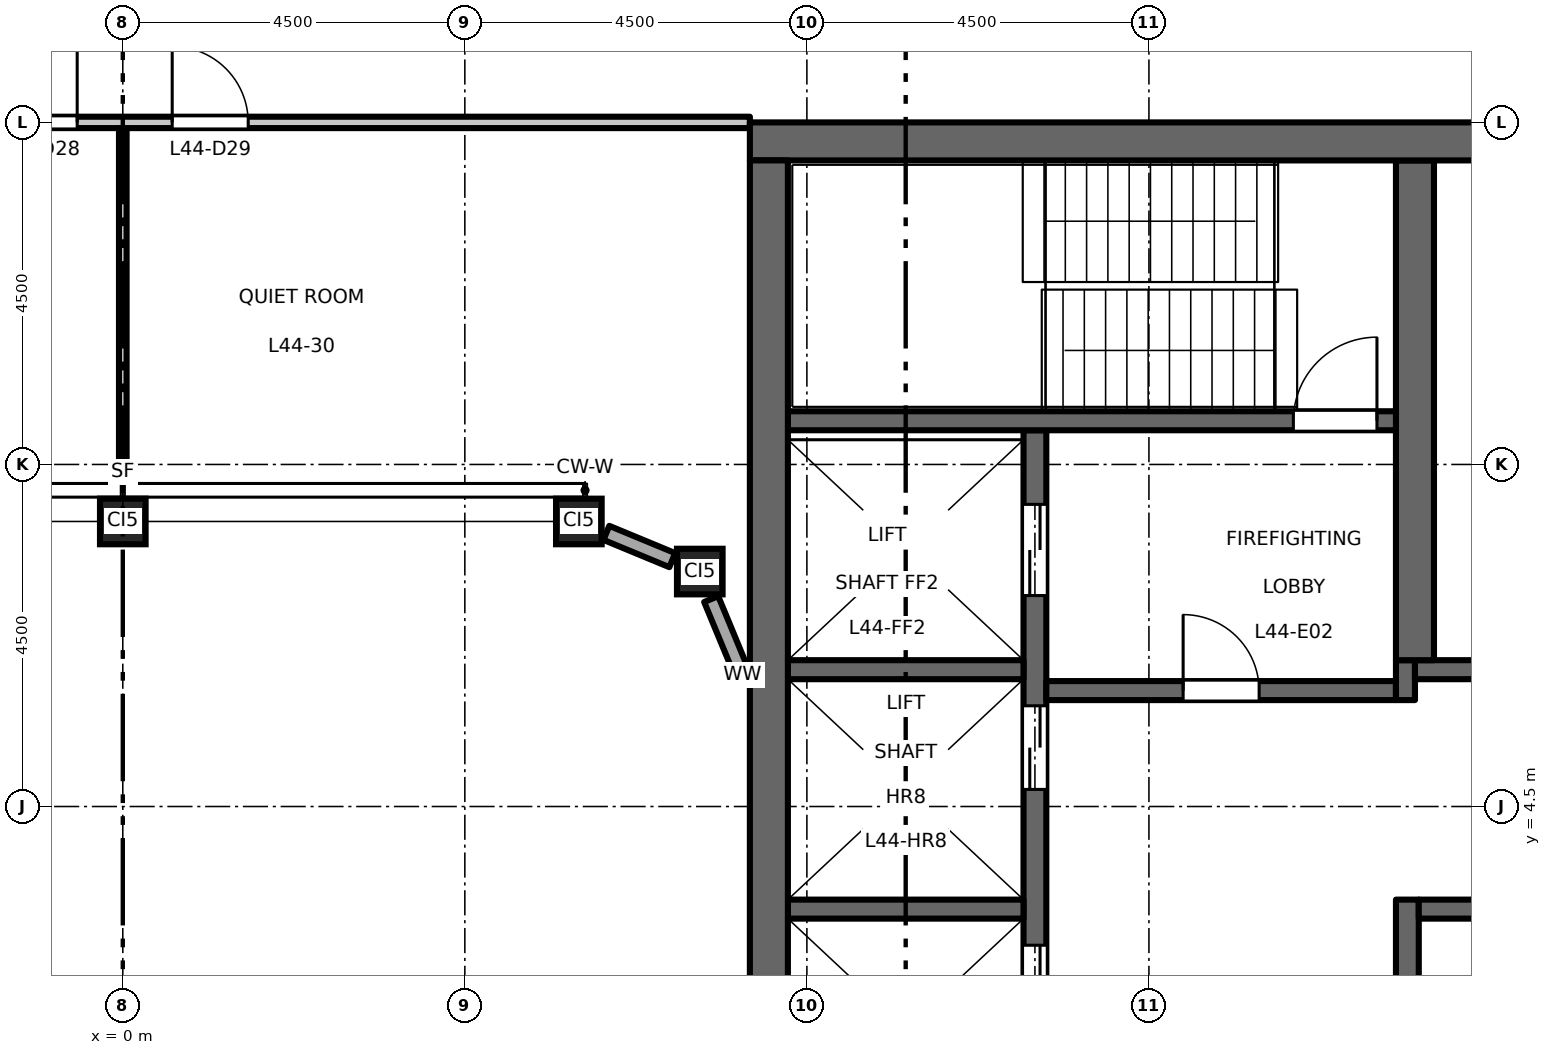
"""IFC4 building model, lengths in metres.
Left out: names, types, materials, properties, quantities, classifications, styles, units other than length and angle.
Written with IfcOpenShell. Run it as: python <this file> out.ifc"""

import sys

from ifc_helpers import new_model, si_unit, direction, frame, frame_2d, origin, origin_2d, place, context, subcontext, project, spatial, rectangle, hollow_rectangle, extrude, element, fill, save


model = new_model("IFC4")
c1 = context("Model", 3, precision=1e-05, world=origin(), true_north=direction((0.0, 1.0)))
c2 = subcontext(c1, "Body", "Model", "MODEL_VIEW")
j1 = project(units=[si_unit("LENGTHUNIT", "METRE"), si_unit("PLANEANGLEUNIT", "RADIAN")], contexts=[c1])
p1 = place(None, origin())
s1 = spatial("IfcSite", under=j1, at=p1, CompositionType="ELEMENT")
p2 = place(p1, origin())
s2 = spatial("IfcBuilding", under=s1, at=p2, CompositionType="ELEMENT")
p3 = place(p2, frame((0.0, 0.0, 206.2)))
s3 = spatial("IfcBuildingStorey", under=s2, at=p3, CompositionType="ELEMENT", Elevation=206.2)
for number, where, z_axis, x_axis in (
    (1, (0.0, 8.25, 0.0), (0.0, 0.0, 1.0), (1.0, 0.0, 0.0)),
    (2, (6.0, 8.25, 0.0), (0.0, 0.0, 1.0), (1.0, 0.0, 0.0)),
    (3, (7.591, 7.591, 0.0), (0.0, 0.0, 1.0), (1.0, 0.0, 0.0)),
):
    element("IfcColumn", number, at=place(p3, frame(where, z_axis=z_axis, x_axis=x_axis)), inside=s3, PredefinedType="COLUMN", context=c2, shape_type="SweptSolid", body=[
        extrude(hollow_rectangle(XDim=0.6, YDim=0.6, WallThickness=0.032, at=origin_2d()), origin(), (0.0, 0.0, 1.0), 4.5),
    ])
p4 = place(p3, frame((12.0, -9.45, 0.0), z_axis=(0.0, 0.0, 1.0), x_axis=(0.0, 1.0, 0.0)))
e4 = element("IfcWall", 4, at=p4, inside=s3, PredefinedType="SHEAR", context=c2, shape_type="SweptSolid", body=[
    extrude(rectangle(XDim=18.9, YDim=0.3, at=frame_2d((9.45, 0.0))), origin(), (0.0, 0.0, 1.0), 4.35),
])
p5 = place(p4, frame((4.725, 0.0, 0.0)))
e5 = element("IfcOpeningElement", 5, at=p5, cuts=e4, PredefinedType="OPENING", context=c2, shape_type="SweptSolid", body=[
    extrude(rectangle(XDim=1.1, YDim=2.1, at=frame_2d((0.55, 1.05))), frame((0.0, 0.16, 0.0), z_axis=(0.0, -1.0, 0.0), x_axis=(1.0, 0.0, 0.0)), (0.0, 0.0, 1.0), 0.32),
])
p6 = place(p4, frame((7.875, 0.0, 0.0)))
e6 = element("IfcOpeningElement", 6, at=p6, cuts=e4, PredefinedType="OPENING", context=c2, shape_type="SweptSolid", body=[
    extrude(rectangle(XDim=1.1, YDim=2.1, at=frame_2d((0.55, 1.05))), frame((0.0, 0.16, 0.0), z_axis=(0.0, -1.0, 0.0), x_axis=(1.0, 0.0, 0.0)), (0.0, 0.0, 1.0), 0.32),
])
p7 = place(p4, frame((11.025, 0.0, 0.0)))
e7 = element("IfcOpeningElement", 7, at=p7, cuts=e4, PredefinedType="OPENING", context=c2, shape_type="SweptSolid", body=[
    extrude(rectangle(XDim=1.1, YDim=2.1, at=frame_2d((0.55, 1.05))), frame((0.0, 0.16, 0.0), z_axis=(0.0, -1.0, 0.0), x_axis=(1.0, 0.0, 0.0)), (0.0, 0.0, 1.0), 0.32),
])
p8 = place(p4, frame((14.175, 0.0, 0.0)))
e8 = element("IfcOpeningElement", 8, at=p8, cuts=e4, PredefinedType="OPENING", context=c2, shape_type="SweptSolid", body=[
    extrude(rectangle(XDim=1.1, YDim=2.1, at=frame_2d((0.55, 1.05))), frame((0.0, 0.16, 0.0), z_axis=(0.0, -1.0, 0.0), x_axis=(1.0, 0.0, 0.0)), (0.0, 0.0, 1.0), 0.32),
])
p9 = place(p4, frame((16.725, 0.0, 0.0)))
e9 = element("IfcOpeningElement", 9, at=p9, cuts=e4, PredefinedType="OPENING", context=c2, shape_type="SweptSolid", body=[
    extrude(rectangle(XDim=1.2, YDim=2.1, at=frame_2d((0.6, 1.05))), frame((0.0, 0.16, 0.0), z_axis=(0.0, -1.0, 0.0), x_axis=(1.0, 0.0, 0.0)), (0.0, 0.0, 1.0), 0.32),
])
p10 = place(p4, frame((0.975, 0.0, 0.0)))
e10 = element("IfcOpeningElement", 10, at=p10, cuts=e4, PredefinedType="OPENING", context=c2, shape_type="SweptSolid", body=[
    extrude(rectangle(XDim=1.2, YDim=2.1, at=frame_2d((0.6, 1.05))), frame((0.0, 0.16, 0.0), z_axis=(0.0, -1.0, 0.0), x_axis=(1.0, 0.0, 0.0)), (0.0, 0.0, 1.0), 0.32),
])
p11 = place(p3, frame((12.15, 6.025, 0.0), z_axis=(0.0, 0.0, 1.0), x_axis=(1.0, 0.0, 0.0)))
e11 = element("IfcWall", 11, at=p11, inside=s3, PredefinedType="SHEAR", context=c2, shape_type="SweptSolid", body=[
    extrude(rectangle(XDim=4.6, YDim=0.25, at=frame_2d((2.3, 0.0))), origin(), (0.0, 0.0, 1.0), 4.35),
])
p12 = place(p11, frame((1.8, 0.0, 0.0)))
e12 = element("IfcOpeningElement", 12, at=p12, cuts=e11, PredefinedType="OPENING", context=c2, shape_type="SweptSolid", body=[
    extrude(rectangle(XDim=1.0, YDim=2.1, at=frame_2d((0.5, 1.05))), frame((0.0, 0.135, 0.0), z_axis=(0.0, -1.0, 0.0), x_axis=(1.0, 0.0, 0.0)), (0.0, 0.0, 1.0), 0.27),
])
p13 = place(p3, frame((16.875, 5.9, 0.0), z_axis=(0.0, 0.0, 1.0), x_axis=(0.0, 1.0, 0.0)))
e13 = element("IfcWall", 13, at=p13, inside=s3, PredefinedType="SHEAR", context=c2, shape_type="SweptSolid", body=[
    extrude(rectangle(XDim=0.525, YDim=0.25, at=frame_2d((0.263, 0.0))), origin(), (0.0, 0.0, 1.0), 4.35),
])
p14 = place(p3, frame((17.0, 6.3, 0.0), z_axis=(0.0, 0.0, 1.0), x_axis=(1.0, 0.0, 0.0)))
e14 = element("IfcWall", 14, at=p14, inside=s3, PredefinedType="SHEAR", context=c2, shape_type="SweptSolid", body=[
    extrude(rectangle(XDim=4.25, YDim=0.25, at=frame_2d((2.125, 0.0))), origin(), (0.0, 0.0, 1.0), 4.35),
])
p15 = place(p3, frame((16.9, -3.275, 0.0), z_axis=(0.0, 0.0, 1.0), x_axis=(0.0, 1.0, 0.0)))
e15 = element("IfcWall", 15, at=p15, inside=s3, PredefinedType="SHEAR", context=c2, shape_type="SweptSolid", body=[
    extrude(rectangle(XDim=6.55, YDim=0.3, at=frame_2d((3.275, 0.0))), origin(), (0.0, 0.0, 1.0), 4.35),
])
p16 = place(p15, frame((2.825, 0.0, 0.0)))
e16 = element("IfcOpeningElement", 16, at=p16, cuts=e15, PredefinedType="OPENING", context=c2, shape_type="SweptSolid", body=[
    extrude(rectangle(XDim=0.9, YDim=2.1, at=frame_2d((0.45, 1.05))), frame((0.0, 0.16, 0.0), z_axis=(0.0, -1.0, 0.0), x_axis=(1.0, 0.0, 0.0)), (0.0, 0.0, 1.0), 0.32),
])
p17 = place(p3, frame((17.05, 3.15, 0.0), z_axis=(0.0, 0.0, 1.0), x_axis=(1.0, 0.0, 0.0)))
e17 = element("IfcWall", 17, at=p17, inside=s3, PredefinedType="SHEAR", context=c2, shape_type="SweptSolid", body=[
    extrude(rectangle(XDim=4.2, YDim=0.25, at=frame_2d((2.1, 0.0))), origin(), (0.0, 0.0, 1.0), 4.35),
])
p18 = place(p3, frame((17.0, 6.425, 0.0), z_axis=(0.0, 0.0, 1.0), x_axis=(0.0, 1.0, 0.0)))
e18 = element("IfcWall", 18, at=p18, inside=s3, PredefinedType="SHEAR", context=c2, shape_type="SweptSolid", body=[
    extrude(rectangle(XDim=6.575, YDim=0.5, at=frame_2d((3.288, 0.0))), origin(), (0.0, 0.0, 1.0), 4.35),
])
for number, where, z_axis, x_axis in (
    (19, (8.75, 3.15, 0.0), (0.0, 0.0, 1.0), (1.0, 0.0, 0.0)),
    (20, (8.75, 6.3, 0.0), (0.0, 0.0, 1.0), (1.0, 0.0, 0.0)),
):
    element("IfcWall", number, at=place(p3, frame(where, z_axis=z_axis, x_axis=x_axis)), inside=s3, PredefinedType="SHEAR", context=c2, shape_type="SweptSolid", body=[
        extrude(rectangle(XDim=3.1, YDim=0.25, at=frame_2d((1.55, 0.0))), origin(), (0.0, 0.0, 1.0), 4.35),
    ])
p19 = place(p3, frame((8.75, 9.575, 0.0), z_axis=(0.0, 0.0, 1.0), x_axis=(1.0, 0.0, 0.0)))
e21 = element("IfcWall", 21, at=p19, inside=s3, PredefinedType="SHEAR", context=c2, shape_type="SweptSolid", body=[
    extrude(rectangle(XDim=8.0, YDim=0.25, at=frame_2d((4.0, 0.0))), origin(), (0.0, 0.0, 1.0), 4.35),
])
p20 = place(p19, frame((6.65, 0.0, 0.0)))
e22 = element("IfcOpeningElement", 22, at=p20, cuts=e21, PredefinedType="OPENING", context=c2, shape_type="SweptSolid", body=[
    extrude(rectangle(XDim=1.1, YDim=2.1, at=frame_2d((0.55, 1.05))), frame((0.0, 0.135, 0.0), z_axis=(0.0, -1.0, 0.0), x_axis=(1.0, 0.0, 0.0)), (0.0, 0.0, 1.0), 0.27),
])
p21 = place(p3, frame((8.25, 13.25, 0.0), z_axis=(0.0, 0.0, 1.0), x_axis=(1.0, 0.0, 0.0)))
e23 = element("IfcWall", 23, at=p21, inside=s3, PredefinedType="SHEAR", context=c2, shape_type="SweptSolid", body=[
    extrude(rectangle(XDim=13.5, YDim=0.5, at=frame_2d((6.75, 0.0))), origin(), (0.0, 0.0, 1.0), 4.35),
])
p22 = place(p3, frame((8.5, -13.0, 0.0), z_axis=(0.0, 0.0, 1.0), x_axis=(0.0, 1.0, 0.0)))
e24 = element("IfcWall", 24, at=p22, inside=s3, PredefinedType="SHEAR", context=c2, shape_type="SweptSolid", body=[
    extrude(rectangle(XDim=26.0, YDim=0.5, at=frame_2d((13.0, 0.0))), origin(), (0.0, 0.0, 1.0), 4.35),
])
p23 = place(p3, frame((8.154, 6.231, 0.0), z_axis=(0.0, 0.0, 1.0), x_axis=(-0.382704496366, 0.923870807235, 0.0)))
e25 = element("IfcWall", 25, at=p23, inside=s3, PredefinedType="STANDARD", context=c2, shape_type="SweptSolid", body=[
    extrude(rectangle(XDim=1.08, YDim=0.2, at=frame_2d((0.54, 0.0))), origin(), (0.0, 0.0, 1.0), 3.918),
])
p24 = place(p3, frame((7.229, 7.741, 0.0), z_axis=(0.0, 0.0, 1.0), x_axis=(-0.923829670615, 0.382803787458, 0.0)))
e26 = element("IfcWall", 26, at=p24, inside=s3, PredefinedType="STANDARD", context=c2, shape_type="SweptSolid", body=[
    extrude(rectangle(XDim=0.938, YDim=0.2, at=frame_2d((0.469, 0.0))), origin(), (0.0, 0.0, 1.0), 3.918),
])
p25 = place(p3, frame((-8.25, 13.5, 0.0), z_axis=(0.0, 0.0, 1.0), x_axis=(1.0, 0.0, 0.0)))
e27 = element("IfcWall", 27, at=p25, inside=s3, PredefinedType="PARTITIONING", context=c2, shape_type="SweptSolid", body=[
    extrude(rectangle(XDim=16.5, YDim=0.15, at=frame_2d((8.25, 0.0))), origin(), (0.0, 0.0, 1.0), 4.35),
])
p26 = place(p25, frame((6.65, 0.0, 0.0)))
e28 = element("IfcOpeningElement", 28, at=p26, cuts=e27, PredefinedType="OPENING", context=c2, shape_type="SweptSolid", body=[
    extrude(rectangle(XDim=1.0, YDim=2.1, at=frame_2d((0.5, 1.05))), frame((0.0, 0.085, 0.0), z_axis=(0.0, -1.0, 0.0), x_axis=(1.0, 0.0, 0.0)), (0.0, 0.0, 1.0), 0.17),
])
p27 = place(p25, frame((8.9, 0.0, 0.0)))
e29 = element("IfcOpeningElement", 29, at=p27, cuts=e27, PredefinedType="OPENING", context=c2, shape_type="SweptSolid", body=[
    extrude(rectangle(XDim=1.0, YDim=2.1, at=frame_2d((0.5, 1.05))), frame((0.0, 0.085, 0.0), z_axis=(0.0, -1.0, 0.0), x_axis=(1.0, 0.0, 0.0)), (0.0, 0.0, 1.0), 0.17),
])
p28 = place(p3, frame((0.0, 8.6, 0.0), z_axis=(0.0, 0.0, 1.0), x_axis=(0.0, 1.0, 0.0)))
e30 = element("IfcWall", 30, at=p28, inside=s3, PredefinedType="PARTITIONING", context=c2, shape_type="SweptSolid", body=[
    extrude(rectangle(XDim=4.825, YDim=0.1, at=frame_2d((2.413, 0.0))), origin(), (0.0, 0.0, 1.0), 3.55),
])
p29 = place(p12, origin())
e31 = element("IfcDoor", 31, at=p29, inside=s3, OperationType="SINGLE_SWING_RIGHT", PredefinedType="DOOR", context=c2, shape_type="SweptSolid", body=[
    extrude(rectangle(XDim=1.0, YDim=2.1, at=frame_2d((0.5, 1.05))), frame((0.0, 0.025, 0.0), z_axis=(0.0, -1.0, 0.0), x_axis=(1.0, 0.0, 0.0)), (0.0, 0.0, 1.0), 0.05),
])
fill(e12, e31)
p30 = place(p20, origin())
e32 = element("IfcDoor", 32, at=p30, inside=s3, OperationType="SINGLE_SWING_LEFT", PredefinedType="DOOR", context=c2, shape_type="SweptSolid", body=[
    extrude(rectangle(XDim=1.1, YDim=2.1, at=frame_2d((0.55, 1.05))), frame((0.0, 0.025, 0.0), z_axis=(0.0, -1.0, 0.0), x_axis=(1.0, 0.0, 0.0)), (0.0, 0.0, 1.0), 0.05),
])
fill(e22, e32)
p31 = place(p7, origin())
e33 = element("IfcDoor", 33, at=p31, inside=s3, OperationType="DOUBLE_DOOR_SLIDING", PredefinedType="DOOR", context=c2, shape_type="SweptSolid", body=[
    extrude(rectangle(XDim=1.1, YDim=2.1, at=frame_2d((0.55, 1.05))), frame((0.0, 0.025, 0.0), z_axis=(0.0, -1.0, 0.0), x_axis=(1.0, 0.0, 0.0)), (0.0, 0.0, 1.0), 0.05),
])
fill(e7, e33)
p32 = place(p8, origin())
e34 = element("IfcDoor", 34, at=p32, inside=s3, OperationType="DOUBLE_DOOR_SLIDING", PredefinedType="DOOR", context=c2, shape_type="SweptSolid", body=[
    extrude(rectangle(XDim=1.1, YDim=2.1, at=frame_2d((0.55, 1.05))), frame((0.0, 0.025, 0.0), z_axis=(0.0, -1.0, 0.0), x_axis=(1.0, 0.0, 0.0)), (0.0, 0.0, 1.0), 0.05),
])
fill(e8, e34)
p33 = place(p9, origin())
e35 = element("IfcDoor", 35, at=p33, inside=s3, OperationType="DOUBLE_DOOR_SLIDING", PredefinedType="DOOR", context=c2, shape_type="SweptSolid", body=[
    extrude(rectangle(XDim=1.2, YDim=2.1, at=frame_2d((0.6, 1.05))), frame((0.0, 0.025, 0.0), z_axis=(0.0, -1.0, 0.0), x_axis=(1.0, 0.0, 0.0)), (0.0, 0.0, 1.0), 0.05),
])
fill(e9, e35)
p34 = place(p26, origin())
e36 = element("IfcDoor", 36, at=p34, inside=s3, OperationType="SINGLE_SWING_RIGHT", PredefinedType="DOOR", context=c2, shape_type="SweptSolid", body=[
    extrude(rectangle(XDim=1.0, YDim=2.1, at=frame_2d((0.5, 1.05))), frame((0.0, 0.025, 0.0), z_axis=(0.0, -1.0, 0.0), x_axis=(1.0, 0.0, 0.0)), (0.0, 0.0, 1.0), 0.05),
])
fill(e28, e36)
p35 = place(p27, origin())
e37 = element("IfcDoor", 37, at=p35, inside=s3, OperationType="SINGLE_SWING_LEFT", PredefinedType="DOOR", context=c2, shape_type="SweptSolid", body=[
    extrude(rectangle(XDim=1.0, YDim=2.1, at=frame_2d((0.5, 1.05))), frame((0.0, 0.025, 0.0), z_axis=(0.0, -1.0, 0.0), x_axis=(1.0, 0.0, 0.0)), (0.0, 0.0, 1.0), 0.05),
])
fill(e29, e37)
save(model, sys.argv[1])
